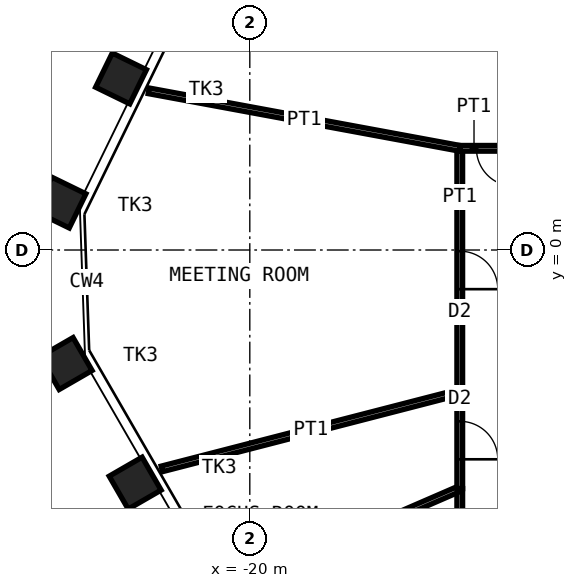
"""IFC4 building model, lengths in metres.
Left out: names, types, materials, properties, quantities, classifications, styles, units other than length and angle.
Written with IfcOpenShell. Run it as: python <this file> out.ifc"""

import sys

from ifc_helpers import new_model, si_unit, direction, frame, frame_2d, origin, origin_2d, place, context, subcontext, project, spatial, rectangle, hollow_rectangle, extrude, element, fill, save


model = new_model("IFC4")
c1 = context("Model", 3, precision=1e-05, world=origin(), true_north=direction((0.0, 1.0)))
c2 = subcontext(c1, "Body", "Model", "MODEL_VIEW")
j1 = project(units=[si_unit("LENGTHUNIT", "METRE"), si_unit("PLANEANGLEUNIT", "RADIAN")], contexts=[c1])
p1 = place(None, origin())
s1 = spatial("IfcSite", under=j1, at=p1, CompositionType="ELEMENT")
p2 = place(p1, origin())
s2 = spatial("IfcBuilding", under=s1, at=p2, CompositionType="ELEMENT")
p3 = place(p2, frame((0.0, 0.0, 251.8)))
s3 = spatial("IfcBuildingStorey", under=s2, at=p3, CompositionType="ELEMENT", Elevation=251.8)
for number, where, z_axis, x_axis in (
    (1, (-23.016, -6.134, 0.0), (0.0, 0.0, 1.0), (0.5, -0.866, 0.0)),
    (2, (-24.833, -2.988, 0.0), (0.0, 0.0, 1.0), (0.5, -0.866, 0.0)),
    (3, (-24.981, 1.248, 0.0), (0.0, 0.0, 1.0), (-0.438, -0.899, 0.0)),
    (4, (-23.388, 4.514, 0.0), (0.0, 0.0, 1.0), (-0.438, -0.899, 0.0)),
):
    element("IfcColumn", number, at=place(p3, frame(where, z_axis=z_axis, x_axis=x_axis)), inside=s3, PredefinedType="COLUMN", context=c2, shape_type="SweptSolid", body=[
        extrude(hollow_rectangle(XDim=1.0, YDim=1.0, WallThickness=0.08, at=origin_2d()), origin(), (0.0, 0.0, 1.0), 4.2),
    ])
p4 = place(p3, frame((-14.475, -11.475, 0.0), z_axis=(0.0, 0.0, 1.0), x_axis=(0.0, 1.0, 0.0)))
e5 = element("IfcWall", 5, at=p4, inside=s3, PredefinedType="PARTITIONING", context=c2, shape_type="SweptSolid", body=[
    extrude(rectangle(XDim=5.198, YDim=0.15, at=frame_2d((2.599, 0.0))), origin(), (0.0, 0.0, 1.0), 3.92),
])
p5 = place(p4, frame((1.699, 0.0, 0.0)))
e6 = element("IfcOpeningElement", 6, at=p5, cuts=e5, PredefinedType="OPENING", context=c2, shape_type="SweptSolid", body=[
    extrude(rectangle(XDim=1.8, YDim=2.4, at=frame_2d((0.9, 1.2))), frame((0.0, 0.085, 0.0), z_axis=(0.0, -1.0, 0.0), x_axis=(1.0, 0.0, 0.0)), (0.0, 0.0, 1.0), 0.17),
])
p6 = place(p3, frame((-20.502, -8.891, 0.0), z_axis=(0.0, 0.0, 1.0), x_axis=(0.917431289744, 0.397894242982, 0.0)))
e7 = element("IfcWall", 7, at=p6, inside=s3, PredefinedType="PARTITIONING", context=c2, shape_type="SweptSolid", body=[
    extrude(rectangle(XDim=6.569, YDim=0.15, at=frame_2d((3.285, 0.0))), origin(), (0.0, 0.0, 1.0), 2.72),
])
p7 = place(p3, frame((-14.475, -6.278, 0.0), z_axis=(0.0, 0.0, 1.0), x_axis=(0.0, 1.0, 0.0)))
e8 = element("IfcWall", 8, at=p7, inside=s3, PredefinedType="PARTITIONING", context=c2, shape_type="SweptSolid", body=[
    extrude(rectangle(XDim=2.542, YDim=0.15, at=frame_2d((1.271, 0.0))), origin(), (0.0, 0.0, 1.0), 3.92),
])
p8 = place(p7, frame((0.771, 0.0, 0.0)))
e9 = element("IfcOpeningElement", 9, at=p8, cuts=e8, PredefinedType="OPENING", context=c2, shape_type="SweptSolid", body=[
    extrude(rectangle(XDim=1.0, YDim=2.4, at=frame_2d((0.5, 1.2))), frame((0.0, 0.085, 0.0), z_axis=(0.0, -1.0, 0.0), x_axis=(1.0, 0.0, 0.0)), (0.0, 0.0, 1.0), 0.17),
])
p9 = place(p3, frame((-22.313, -5.759, 0.0), z_axis=(0.0, 0.0, 1.0), x_axis=(0.968265788926, 0.249922712042, 0.0)))
e10 = element("IfcWall", 10, at=p9, inside=s3, PredefinedType="PARTITIONING", context=c2, shape_type="SweptSolid", body=[
    extrude(rectangle(XDim=8.095, YDim=0.15, at=frame_2d((4.048, 0.0))), origin(), (0.0, 0.0, 1.0), 2.72),
])
p10 = place(p3, frame((-14.475, -3.736, 0.0), z_axis=(0.0, 0.0, 1.0), x_axis=(0.0, 1.0, 0.0)))
e11 = element("IfcWall", 11, at=p10, inside=s3, PredefinedType="PARTITIONING", context=c2, shape_type="SweptSolid", body=[
    extrude(rectangle(XDim=6.412, YDim=0.15, at=frame_2d((3.206, 0.0))), origin(), (0.0, 0.0, 1.0), 3.92),
])
p11 = place(p10, frame((2.706, 0.0, 0.0)))
e12 = element("IfcOpeningElement", 12, at=p11, cuts=e11, PredefinedType="OPENING", context=c2, shape_type="SweptSolid", body=[
    extrude(rectangle(XDim=1.0, YDim=2.4, at=frame_2d((0.5, 1.2))), frame((0.0, 0.085, 0.0), z_axis=(0.0, -1.0, 0.0), x_axis=(1.0, 0.0, 0.0)), (0.0, 0.0, 1.0), 0.17),
])
p12 = place(p3, frame((-22.661, 4.189, 0.0), z_axis=(0.0, 0.0, 1.0), x_axis=(0.983345347199, -0.181746879316, 0.0)))
e13 = element("IfcWall", 13, at=p12, inside=s3, PredefinedType="PARTITIONING", context=c2, shape_type="SweptSolid", body=[
    extrude(rectangle(XDim=8.324, YDim=0.15, at=frame_2d((4.162, 0.0))), origin(), (0.0, 0.0, 1.0), 2.72),
])
p13 = place(p3, frame((-14.475, 2.676, 0.0), z_axis=(0.0, 0.0, 1.0), x_axis=(1.0, 0.0, 0.0)))
e14 = element("IfcWall", 14, at=p13, inside=s3, PredefinedType="PARTITIONING", context=c2, shape_type="SweptSolid", body=[
    extrude(rectangle(XDim=1.875, YDim=0.15, at=frame_2d((0.938, 0.0))), origin(), (0.0, 0.0, 1.0), 2.72),
])
p14 = place(p13, frame((0.438, 0.0, 0.0)))
e15 = element("IfcOpeningElement", 15, at=p14, cuts=e14, PredefinedType="OPENING", context=c2, shape_type="SweptSolid", body=[
    extrude(rectangle(XDim=1.0, YDim=2.4, at=frame_2d((0.5, 1.2))), frame((0.0, 0.085, 0.0), z_axis=(0.0, -1.0, 0.0), x_axis=(1.0, 0.0, 0.0)), (0.0, 0.0, 1.0), 0.17),
])
p15 = place(p8, origin())
e16 = element("IfcDoor", 16, at=p15, inside=s3, OperationType="SINGLE_SWING_LEFT", PredefinedType="DOOR", context=c2, shape_type="SweptSolid", body=[
    extrude(rectangle(XDim=1.0, YDim=2.4, at=frame_2d((0.5, 1.2))), frame((0.0, 0.025, 0.0), z_axis=(0.0, -1.0, 0.0), x_axis=(1.0, 0.0, 0.0)), (0.0, 0.0, 1.0), 0.05),
])
fill(e9, e16)
p16 = place(p11, origin())
e17 = element("IfcDoor", 17, at=p16, inside=s3, OperationType="SINGLE_SWING_LEFT", PredefinedType="DOOR", context=c2, shape_type="SweptSolid", body=[
    extrude(rectangle(XDim=1.0, YDim=2.4, at=frame_2d((0.5, 1.2))), frame((0.0, 0.025, 0.0), z_axis=(0.0, -1.0, 0.0), x_axis=(1.0, 0.0, 0.0)), (0.0, 0.0, 1.0), 0.05),
])
fill(e12, e17)
p17 = place(p14, origin())
e18 = element("IfcDoor", 18, at=p17, inside=s3, OperationType="SINGLE_SWING_RIGHT", PredefinedType="DOOR", context=c2, shape_type="SweptSolid", body=[
    extrude(rectangle(XDim=1.0, YDim=2.4, at=frame_2d((0.5, 1.2))), frame((0.0, 0.025, 0.0), z_axis=(0.0, -1.0, 0.0), x_axis=(1.0, 0.0, 0.0)), (0.0, 0.0, 1.0), 0.05),
])
fill(e15, e18)
save(model, sys.argv[1])
